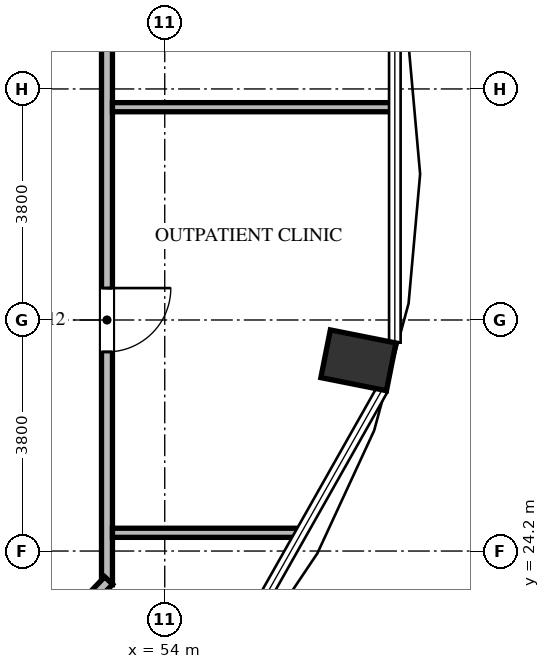
"""IFC4 building model, lengths in metres.
Left out: names, types, materials, properties, quantities, classifications, styles, units other than length and angle.
Written with IfcOpenShell. Run it as: python <this file> out.ifc"""

import sys

from ifc_helpers import new_model, si_unit, direction, frame, frame_2d, origin, origin_2d, place, context, subcontext, project, spatial, rectangle, extrude, element, fill, save


model = new_model("IFC4")
c1 = context("Model", 3, precision=1e-05, world=origin(), true_north=direction((0.0, 1.0)))
c2 = subcontext(c1, "Body", "Model", "MODEL_VIEW")
j1 = project(units=[si_unit("LENGTHUNIT", "METRE"), si_unit("PLANEANGLEUNIT", "RADIAN")], contexts=[c1])
p1 = place(None, origin())
s1 = spatial("IfcSite", under=j1, at=p1, CompositionType="ELEMENT")
p2 = place(p1, origin())
s2 = spatial("IfcBuilding", under=s1, at=p2, CompositionType="ELEMENT")
p3 = place(p2, frame((0.0, 0.0, 227.664)))
s3 = spatial("IfcBuildingStorey", under=s2, at=p3, CompositionType="ELEMENT", Elevation=227.664)
p4 = place(p3, frame((57.185, 27.337, 0.0), z_axis=(0.0, 0.0, 1.0), x_axis=(0.980785280403, -0.195090322016, 0.0)))
e1 = element("IfcColumn", 1, at=p4, inside=s3, PredefinedType="COLUMN", context=c2, shape_type="SweptSolid", body=[
    extrude(rectangle(XDim=1.1, YDim=0.8, at=origin_2d()), origin(), (0.0, 0.0, 1.0), 3.648),
])
p5 = place(p3, frame((53.05, 37.155, 0.0), z_axis=(0.0, 0.0, 1.0), x_axis=(0.0, -1.0, 0.0)))
e2 = element("IfcWall", 2, at=p5, inside=s3, PredefinedType="PARTITIONING", context=c2, shape_type="SweptSolid", body=[
    extrude(rectangle(XDim=13.509, YDim=0.18, at=frame_2d((6.754, 0.0))), origin(), (0.0, 0.0, 1.0), 3.448),
])
p6 = place(p5, frame((8.629, 0.0, 0.0)))
e3 = element("IfcOpeningElement", 3, at=p6, cuts=e2, PredefinedType="OPENING", context=c2, shape_type="SweptSolid", body=[
    extrude(rectangle(XDim=1.05, YDim=2.15, at=frame_2d((0.525, 1.075))), frame((0.0, 0.1, 0.0), z_axis=(0.0, -1.0, 0.0), x_axis=(1.0, 0.0, 0.0)), (0.0, 0.0, 1.0), 0.2),
])
p7 = place(p3, frame((53.078, 23.714, 0.0), z_axis=(0.0, 0.0, 1.0), x_axis=(-0.691353379446, -0.722516785085, 0.0)))
e4 = element("IfcWall", 4, at=p7, inside=s3, PredefinedType="PARTITIONING", context=c2, shape_type="SweptSolid", body=[
    extrude(rectangle(XDim=3.604, YDim=0.18, at=frame_2d((1.802, 0.0))), origin(), (0.0, 0.0, 1.0), 3.448),
])
p8 = place(p3, frame((53.14, 24.5, 0.0), z_axis=(0.0, 0.0, 1.0), x_axis=(1.0, 0.0, 0.0)))
e5 = element("IfcWall", 5, at=p8, inside=s3, PredefinedType="PARTITIONING", context=c2, shape_type="SweptSolid", body=[
    extrude(rectangle(XDim=3.095, YDim=0.15, at=frame_2d((1.548, 0.0))), origin(), (0.0, 0.0, 1.0), 3.448),
])
p9 = place(p3, frame((53.14, 31.5, 0.0), z_axis=(0.0, 0.0, 1.0), x_axis=(1.0, 0.0, 0.0)))
e6 = element("IfcWall", 6, at=p9, inside=s3, PredefinedType="PARTITIONING", context=c2, shape_type="SweptSolid", body=[
    extrude(rectangle(XDim=4.632, YDim=0.15, at=frame_2d((2.316, 0.0))), origin(), (0.0, 0.0, 1.0), 3.448),
])
p10 = place(p6, origin())
e7 = element("IfcDoor", 7, at=p10, inside=s3, OperationType="SINGLE_SWING_LEFT", PredefinedType="DOOR", context=c2, shape_type="SweptSolid", body=[
    extrude(rectangle(XDim=1.05, YDim=2.15, at=frame_2d((0.525, 1.075))), frame((0.0, 0.025, 0.0), z_axis=(0.0, -1.0, 0.0), x_axis=(1.0, 0.0, 0.0)), (0.0, 0.0, 1.0), 0.05),
])
fill(e3, e7)
save(model, sys.argv[1])
